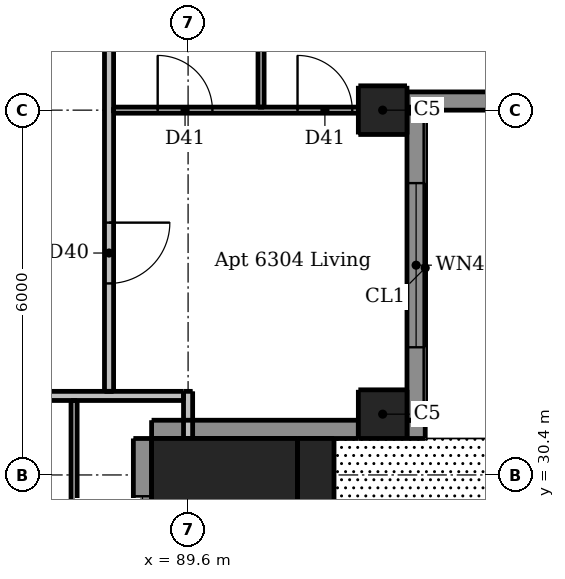
"""IFC4 building model, lengths in metres.
Left out: names, types, materials, properties, quantities, classifications, styles, units other than length and angle.
Written with IfcOpenShell. Run it as: python <this file> out.ifc"""

import sys

from ifc_helpers import new_model, si_unit, direction, frame, frame_2d, origin, origin_2d, place, context, subcontext, project, spatial, rectangle, extrude, element, fill, save


model = new_model("IFC4")
c1 = context("Model", 3, precision=1e-05, world=origin(), true_north=direction((0.0, 1.0)))
c2 = subcontext(c1, "Body", "Model", "MODEL_VIEW")
j1 = project(units=[si_unit("LENGTHUNIT", "METRE"), si_unit("PLANEANGLEUNIT", "RADIAN")], contexts=[c1])
p1 = place(None, origin())
s1 = spatial("IfcSite", under=j1, at=p1, CompositionType="ELEMENT")
p2 = place(p1, origin())
s2 = spatial("IfcBuilding", under=s1, at=p2, CompositionType="ELEMENT")
p3 = place(p2, frame((0.0, 0.0, 238.9)))
s3 = spatial("IfcBuildingStorey", under=s2, at=p3, CompositionType="ELEMENT", Elevation=238.9)
for number, where, z_axis, x_axis in (
    (1, (92.8, 31.4, 0.0), (0.0, 0.0, 1.0), (1.0, 0.0, 0.0)),
    (2, (92.8, 36.4, 0.0), (0.0, 0.0, 1.0), (1.0, 0.0, 0.0)),
):
    element("IfcColumn", number, at=place(p3, frame(where, z_axis=z_axis, x_axis=x_axis)), inside=s3, PredefinedType="COLUMN", context=c2, shape_type="SweptSolid", body=[
        extrude(rectangle(XDim=0.8, YDim=0.8, at=origin_2d()), origin(), (0.0, 0.0, 1.0), 3.05),
    ])
p4 = place(p3, frame((91.7, 29.8, 0.0), z_axis=(0.0, 0.0, 1.0), x_axis=(1.0, 0.0, 0.0)))
e3 = element("IfcColumn", 3, at=p4, inside=s3, PredefinedType="COLUMN", context=c2, shape_type="SweptSolid", body=[
    extrude(rectangle(XDim=0.6, YDim=2.4, at=origin_2d()), origin(), (0.0, 0.0, 1.0), 2.4),
])
p5 = place(p3, frame((90.2, 29.8, 0.0), z_axis=(0.0, 0.0, 1.0), x_axis=(1.0, 0.0, 0.0)))
e4 = element("IfcColumn", 4, at=p5, inside=s3, PredefinedType="COLUMN", context=c2, shape_type="SweptSolid", body=[
    extrude(rectangle(XDim=2.4, YDim=2.4, at=origin_2d()), origin(), (0.0, 0.0, 1.0), 3.3),
])
p6 = place(p3, frame((88.85, 27.6, 0.0), z_axis=(0.0, 0.0, 1.0), x_axis=(0.0, 1.0, 0.0)))
e5 = element("IfcWall", 5, at=p6, inside=s3, PredefinedType="SOLIDWALL", context=c2, shape_type="SweptSolid", body=[
    extrude(rectangle(XDim=3.4, YDim=0.3, at=frame_2d((1.7, 0.0))), origin(), (0.0, 0.0, 1.0), 3.05),
])
p7 = place(p6, frame((0.95, 0.0, 0.9)))
e6 = element("IfcOpeningElement", 6, at=p7, cuts=e5, PredefinedType="OPENING", context=c2, shape_type="SweptSolid", body=[
    extrude(rectangle(XDim=1.5, YDim=1.5, at=frame_2d((0.75, 0.75))), frame((0.0, 0.16, 0.0), z_axis=(0.0, -1.0, 0.0), x_axis=(1.0, 0.0, 0.0)), (0.0, 0.0, 1.0), 0.32),
])
p8 = place(p3, frame((89.0, 31.15, 0.0), z_axis=(0.0, 0.0, 1.0), x_axis=(1.0, 0.0, 0.0)))
e7 = element("IfcWall", 7, at=p8, inside=s3, PredefinedType="SOLIDWALL", context=c2, shape_type="SweptSolid", body=[
    extrude(rectangle(XDim=3.4, YDim=0.3, at=frame_2d((1.7, 0.0))), origin(), (0.0, 0.0, 1.0), 3.05),
])
p9 = place(p3, frame((93.2, 31.15, 0.0), z_axis=(0.0, 0.0, 1.0), x_axis=(1.0, 0.0, 0.0)))
e8 = element("IfcWall", 8, at=p9, inside=s3, PredefinedType="SOLIDWALL", context=c2, shape_type="SweptSolid", body=[
    extrude(rectangle(XDim=0.3, YDim=0.3, at=frame_2d((0.15, 0.0))), origin(), (0.0, 0.0, 1.0), 3.05),
])
p10 = place(p3, frame((93.2, 36.55, 0.0), z_axis=(0.0, 0.0, 1.0), x_axis=(1.0, 0.0, 0.0)))
e9 = element("IfcWall", 9, at=p10, inside=s3, PredefinedType="SOLIDWALL", context=c2, shape_type="SweptSolid", body=[
    extrude(rectangle(XDim=1.8, YDim=0.3, at=frame_2d((0.9, 0.0))), origin(), (0.0, 0.0, 1.0), 3.05),
])
p11 = place(p3, frame((93.35, 31.3, 0.0), z_axis=(0.0, 0.0, 1.0), x_axis=(0.0, 1.0, 0.0)))
e10 = element("IfcWall", 10, at=p11, inside=s3, PredefinedType="SOLIDWALL", context=c2, shape_type="SweptSolid", body=[
    extrude(rectangle(XDim=5.1, YDim=0.3, at=frame_2d((2.55, 0.0))), origin(), (0.0, 0.0, 1.0), 3.05),
])
p12 = place(p11, frame((1.2, 0.0, 0.15)))
e11 = element("IfcOpeningElement", 11, at=p12, cuts=e10, PredefinedType="OPENING", context=c2, shape_type="SweptSolid", body=[
    extrude(rectangle(XDim=2.7, YDim=2.1, at=frame_2d((1.35, 1.05))), frame((0.0, 0.16, 0.0), z_axis=(0.0, -1.0, 0.0), x_axis=(1.0, 0.0, 0.0)), (0.0, 0.0, 1.0), 0.32),
])
p13 = place(p3, frame((87.725, 29.05, 0.0), z_axis=(0.0, 0.0, 1.0), x_axis=(0.0, 1.0, 0.0)))
e12 = element("IfcWall", 12, at=p13, inside=s3, PredefinedType="PARTITIONING", context=c2, shape_type="SweptSolid", body=[
    extrude(rectangle(XDim=2.575, YDim=0.1, at=frame_2d((1.288, 0.0))), origin(), (0.0, 0.0, 1.0), 3.05),
])
p14 = place(p3, frame((90.8, 36.45, 0.0), z_axis=(0.0, 0.0, 1.0), x_axis=(0.0, 1.0, 0.0)))
e13 = element("IfcWall", 13, at=p14, inside=s3, PredefinedType="PARTITIONING", context=c2, shape_type="SweptSolid", body=[
    extrude(rectangle(XDim=5.875, YDim=0.1, at=frame_2d((2.938, 0.0))), origin(), (0.0, 0.0, 1.0), 3.05),
])
p15 = place(p14, frame((3.75, 0.0, 0.0)))
e14 = element("IfcOpeningElement", 14, at=p15, cuts=e13, PredefinedType="OPENING", context=c2, shape_type="SweptSolid", body=[
    extrude(rectangle(XDim=0.8, YDim=2.1, at=frame_2d((0.4, 1.05))), frame((0.0, 0.06, 0.0), z_axis=(0.0, -1.0, 0.0), x_axis=(1.0, 0.0, 0.0)), (0.0, 0.0, 1.0), 0.12),
])
p16 = place(p3, frame((88.375, 36.4, 0.0), z_axis=(0.0, 0.0, 1.0), x_axis=(1.0, 0.0, 0.0)))
e15 = element("IfcWall", 15, at=p16, inside=s3, PredefinedType="PARTITIONING", context=c2, shape_type="SweptSolid", body=[
    extrude(rectangle(XDim=5.125, YDim=0.1, at=frame_2d((2.562, 0.0))), origin(), (0.0, 0.0, 1.0), 2.647),
])
p17 = place(p16, frame((0.725, 0.0, 0.0)))
e16 = element("IfcOpeningElement", 16, at=p17, cuts=e15, PredefinedType="OPENING", context=c2, shape_type="SweptSolid", body=[
    extrude(rectangle(XDim=0.9, YDim=2.1, at=frame_2d((0.45, 1.05))), frame((0.0, 0.06, 0.0), z_axis=(0.0, -1.0, 0.0), x_axis=(1.0, 0.0, 0.0)), (0.0, 0.0, 1.0), 0.12),
])
p18 = place(p16, frame((3.025, 0.0, 0.0)))
e17 = element("IfcOpeningElement", 17, at=p18, cuts=e15, PredefinedType="OPENING", context=c2, shape_type="SweptSolid", body=[
    extrude(rectangle(XDim=0.9, YDim=2.1, at=frame_2d((0.45, 1.05))), frame((0.0, 0.06, 0.0), z_axis=(0.0, -1.0, 0.0), x_axis=(1.0, 0.0, 0.0)), (0.0, 0.0, 1.0), 0.12),
])
p19 = place(p3, frame((88.3, 61.175, 0.0), z_axis=(0.0, 0.0, 1.0), x_axis=(0.0, -1.0, 0.0)))
e18 = element("IfcWall", 18, at=p19, inside=s3, PredefinedType="PARTITIONING", context=c2, shape_type="SweptSolid", body=[
    extrude(rectangle(XDim=29.4, YDim=0.15, at=frame_2d((14.7, 0.0))), origin(), (0.0, 0.0, 1.0), 3.05),
])
p20 = place(p19, frame((26.625, 0.0, 0.0)))
e19 = element("IfcOpeningElement", 19, at=p20, cuts=e18, PredefinedType="OPENING", context=c2, shape_type="SweptSolid", body=[
    extrude(rectangle(XDim=1.0, YDim=2.1, at=frame_2d((0.5, 1.05))), frame((0.0, 0.085, 0.0), z_axis=(0.0, -1.0, 0.0), x_axis=(1.0, 0.0, 0.0)), (0.0, 0.0, 1.0), 0.17),
])
p21 = place(p19, frame((15.275, 0.0, 0.0)))
e20 = element("IfcOpeningElement", 20, at=p21, cuts=e18, PredefinedType="OPENING", context=c2, shape_type="SweptSolid", body=[
    extrude(rectangle(XDim=1.0, YDim=2.1, at=frame_2d((0.5, 1.05))), frame((0.0, 0.085, 0.0), z_axis=(0.0, -1.0, 0.0), x_axis=(1.0, 0.0, 0.0)), (0.0, 0.0, 1.0), 0.17),
])
p22 = place(p19, frame((9.275, 0.0, 0.0)))
e21 = element("IfcOpeningElement", 21, at=p22, cuts=e18, PredefinedType="OPENING", context=c2, shape_type="SweptSolid", body=[
    extrude(rectangle(XDim=1.0, YDim=2.1, at=frame_2d((0.5, 1.05))), frame((0.0, 0.085, 0.0), z_axis=(0.0, -1.0, 0.0), x_axis=(1.0, 0.0, 0.0)), (0.0, 0.0, 1.0), 0.17),
])
p23 = place(p19, frame((3.275, 0.0, 0.0)))
e22 = element("IfcOpeningElement", 22, at=p23, cuts=e18, PredefinedType="OPENING", context=c2, shape_type="SweptSolid", body=[
    extrude(rectangle(XDim=1.0, YDim=2.1, at=frame_2d((0.5, 1.05))), frame((0.0, 0.085, 0.0), z_axis=(0.0, -1.0, 0.0), x_axis=(1.0, 0.0, 0.0)), (0.0, 0.0, 1.0), 0.17),
])
p24 = place(p3, frame((89.6, 31.0, 0.0), z_axis=(0.0, 0.0, 1.0), x_axis=(0.0, 1.0, 0.0)))
e23 = element("IfcWall", 23, at=p24, inside=s3, PredefinedType="PARTITIONING", context=c2, shape_type="SweptSolid", body=[
    extrude(rectangle(XDim=0.775, YDim=0.15, at=frame_2d((0.387, 0.0))), origin(), (0.0, 0.0, 1.0), 3.05),
])
p25 = place(p3, frame((89.525, 31.7, 0.0), z_axis=(0.0, 0.0, 1.0), x_axis=(-1.0, 0.0, 0.0)))
e24 = element("IfcWall", 24, at=p25, inside=s3, PredefinedType="PARTITIONING", context=c2, shape_type="SweptSolid", body=[
    extrude(rectangle(XDim=30.55, YDim=0.15, at=frame_2d((15.275, 0.0))), origin(), (0.0, 0.0, 1.0), 3.05),
])
p26 = place(p25, frame((26.775, 0.0, 0.0)))
e25 = element("IfcOpeningElement", 25, at=p26, cuts=e24, PredefinedType="OPENING", context=c2, shape_type="SweptSolid", body=[
    extrude(rectangle(XDim=1.0, YDim=2.1, at=frame_2d((0.5, 1.05))), frame((0.0, 0.085, 0.0), z_axis=(0.0, -1.0, 0.0), x_axis=(1.0, 0.0, 0.0)), (0.0, 0.0, 1.0), 0.17),
])
p27 = place(p25, frame((14.425, 0.0, 0.0)))
e26 = element("IfcOpeningElement", 26, at=p27, cuts=e24, PredefinedType="OPENING", context=c2, shape_type="SweptSolid", body=[
    extrude(rectangle(XDim=1.0, YDim=2.1, at=frame_2d((0.5, 1.05))), frame((0.0, 0.085, 0.0), z_axis=(0.0, -1.0, 0.0), x_axis=(1.0, 0.0, 0.0)), (0.0, 0.0, 1.0), 0.17),
])
p28 = place(p25, frame((6.962, 0.0, 0.0)))
e27 = element("IfcOpeningElement", 27, at=p28, cuts=e24, PredefinedType="OPENING", context=c2, shape_type="SweptSolid", body=[
    extrude(rectangle(XDim=1.0, YDim=2.1, at=frame_2d((0.5, 1.05))), frame((0.0, 0.085, 0.0), z_axis=(0.0, -1.0, 0.0), x_axis=(1.0, 0.0, 0.0)), (0.0, 0.0, 1.0), 0.17),
])
p29 = place(p7, origin())
e28 = element("IfcWindow", 28, at=p29, inside=s3, PartitioningType="DOUBLE_PANEL_VERTICAL", PredefinedType="WINDOW", context=c2, shape_type="SweptSolid", body=[
    extrude(rectangle(XDim=1.5, YDim=1.5, at=frame_2d((0.75, 0.75))), frame((0.0, 0.03, 0.0), z_axis=(0.0, -1.0, 0.0), x_axis=(1.0, 0.0, 0.0)), (0.0, 0.0, 1.0), 0.06),
])
fill(e6, e28)
p30 = place(p12, origin())
e29 = element("IfcWindow", 29, at=p30, inside=s3, PartitioningType="DOUBLE_PANEL_VERTICAL", PredefinedType="WINDOW", context=c2, shape_type="SweptSolid", body=[
    extrude(rectangle(XDim=2.7, YDim=2.1, at=frame_2d((1.35, 1.05))), frame((0.0, 0.03, 0.0), z_axis=(0.0, -1.0, 0.0), x_axis=(1.0, 0.0, 0.0)), (0.0, 0.0, 1.0), 0.06),
])
fill(e11, e29)
p31 = place(p20, origin())
e30 = element("IfcDoor", 30, at=p31, inside=s3, OperationType="SINGLE_SWING_LEFT", PredefinedType="DOOR", context=c2, shape_type="SweptSolid", body=[
    extrude(rectangle(XDim=1.0, YDim=2.1, at=frame_2d((0.5, 1.05))), frame((0.0, 0.025, 0.0), z_axis=(0.0, -1.0, 0.0), x_axis=(1.0, 0.0, 0.0)), (0.0, 0.0, 1.0), 0.05),
])
fill(e19, e30)
p32 = place(p17, origin())
e31 = element("IfcDoor", 31, at=p32, inside=s3, OperationType="SINGLE_SWING_LEFT", PredefinedType="DOOR", context=c2, shape_type="SweptSolid", body=[
    extrude(rectangle(XDim=0.9, YDim=2.1, at=frame_2d((0.45, 1.05))), frame((0.0, 0.025, 0.0), z_axis=(0.0, -1.0, 0.0), x_axis=(1.0, 0.0, 0.0)), (0.0, 0.0, 1.0), 0.05),
])
fill(e16, e31)
p33 = place(p18, origin())
e32 = element("IfcDoor", 32, at=p33, inside=s3, OperationType="SINGLE_SWING_LEFT", PredefinedType="DOOR", context=c2, shape_type="SweptSolid", body=[
    extrude(rectangle(XDim=0.9, YDim=2.1, at=frame_2d((0.45, 1.05))), frame((0.0, 0.025, 0.0), z_axis=(0.0, -1.0, 0.0), x_axis=(1.0, 0.0, 0.0)), (0.0, 0.0, 1.0), 0.05),
])
fill(e17, e32)
save(model, sys.argv[1])
